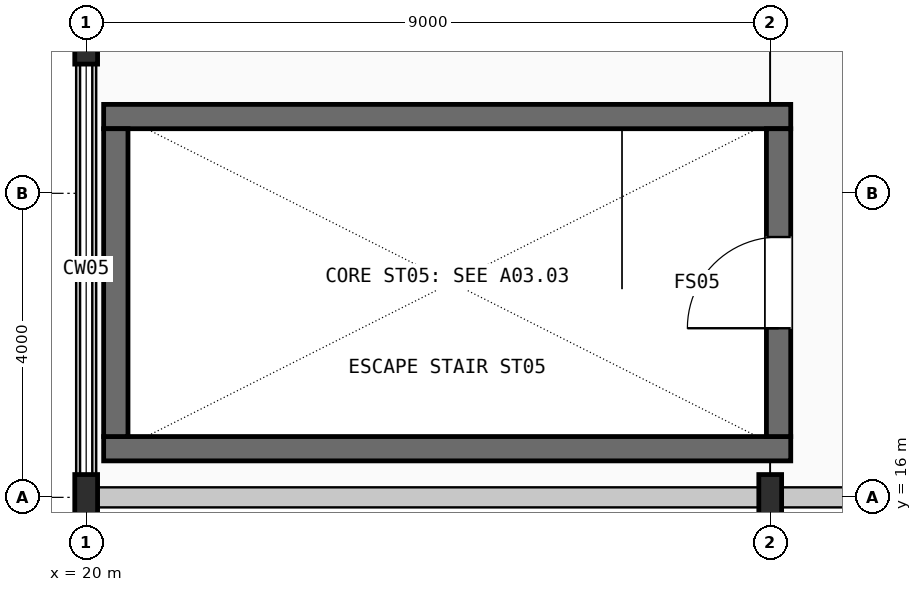
"""IFC4 building model, lengths in metres.
Left out: names, types, materials, properties, quantities, classifications, styles, units other than length and angle.
Written with IfcOpenShell. Run it as: python <this file> out.ifc"""

import sys

from ifc_helpers import new_model, si_unit, direction, frame, frame_2d, origin, origin_2d, place, context, subcontext, project, spatial, rectangle, i_section, extrude, element, fill, save


model = new_model("IFC4")
c1 = context("Model", 3, precision=1e-05, world=origin(), true_north=direction((0.0, 1.0)))
c2 = subcontext(c1, "Body", "Model", "MODEL_VIEW")
j1 = project(units=[si_unit("LENGTHUNIT", "METRE"), si_unit("PLANEANGLEUNIT", "RADIAN")], contexts=[c1])
p1 = place(None, origin())
s1 = spatial("IfcSite", under=j1, at=p1, CompositionType="ELEMENT")
p2 = place(p1, origin())
s2 = spatial("IfcBuilding", under=s1, at=p2, CompositionType="ELEMENT")
p3 = place(p2, frame((0.0, 0.0, 16.8)))
s3 = spatial("IfcBuildingStorey", under=s2, at=p3, CompositionType="ELEMENT", Elevation=16.8)
for number, where, z_axis, x_axis in (
    (1, (20.0, 16.0, 0.0), (0.0, 0.0, 1.0), (1.0, 0.0, 0.0)),
    (2, (20.0, 22.0, 0.0), (0.0, 0.0, 1.0), (1.0, 0.0, 0.0)),
    (3, (29.0, 16.0, 0.0), (0.0, 0.0, 1.0), (1.0, 0.0, 0.0)),
):
    element("IfcColumn", number, at=place(p3, frame(where, z_axis=z_axis, x_axis=x_axis)), inside=s3, PredefinedType="COLUMN", context=c2, shape_type="SweptSolid", body=[
        extrude(i_section(OverallWidth=0.3, OverallDepth=0.6, WebThickness=0.015, FlangeThickness=0.03, FilletRadius=0.027, at=origin_2d()), origin(), (0.0, 0.0, 1.0), 5.2),
    ])
for number, where, z_axis, x_axis in (
    (4, (20.23, 16.64, 0.0), (0.0, 0.0, 1.0), (1.0, 0.0, 0.0)),
    (5, (20.23, 21.01, 0.0), (0.0, 0.0, 1.0), (1.0, 0.0, 0.0)),
):
    element("IfcWall", number, at=place(p3, frame(where, z_axis=z_axis, x_axis=x_axis)), inside=s3, PredefinedType="SHEAR", context=c2, shape_type="SweptSolid", body=[
        extrude(rectangle(XDim=9.04, YDim=0.32, at=frame_2d((4.52, 0.0))), origin(), (0.0, 0.0, 1.0), 4.2),
    ])
p4 = place(p3, frame((20.39, 16.8, 0.0), z_axis=(0.0, 0.0, 1.0), x_axis=(0.0, 1.0, 0.0)))
e6 = element("IfcWall", 6, at=p4, inside=s3, PredefinedType="SHEAR", context=c2, shape_type="SweptSolid", body=[
    extrude(rectangle(XDim=4.05, YDim=0.32, at=frame_2d((2.025, 0.0))), origin(), (0.0, 0.0, 1.0), 4.2),
])
p5 = place(p3, frame((29.11, 16.8, 0.0), z_axis=(0.0, 0.0, 1.0), x_axis=(0.0, 1.0, 0.0)))
e7 = element("IfcWall", 7, at=p5, inside=s3, PredefinedType="SHEAR", context=c2, shape_type="SweptSolid", body=[
    extrude(rectangle(XDim=4.05, YDim=0.32, at=frame_2d((2.025, 0.0))), origin(), (0.0, 0.0, 1.0), 4.2),
])
p6 = place(p5, frame((1.425, 0.0, 0.0)))
e8 = element("IfcOpeningElement", 8, at=p6, cuts=e7, PredefinedType="OPENING", context=c2, shape_type="SweptSolid", body=[
    extrude(rectangle(XDim=1.2, YDim=2.2, at=frame_2d((0.6, 1.1))), frame((0.0, 0.17, 0.0), z_axis=(0.0, -1.0, 0.0), x_axis=(1.0, 0.0, 0.0)), (0.0, 0.0, 1.0), 0.34),
])
for number, where, z_axis, x_axis in (
    (9, (20.146, 16.0, 0.0), (0.0, 0.0, 1.0), (1.0, 0.0, 0.0)),
    (10, (29.146, 16.0, 0.0), (0.0, 0.0, 1.0), (1.0, 0.0, 0.0)),
):
    element("IfcWall", number, at=place(p3, frame(where, z_axis=z_axis, x_axis=x_axis)), inside=s3, PredefinedType="STANDARD", context=c2, shape_type="SweptSolid", body=[
        extrude(rectangle(XDim=8.708, YDim=0.264, at=frame_2d((4.354, 0.0))), origin(), (0.0, 0.0, 1.0), 4.4),
    ])
p7 = place(p3, frame((20.0, 16.296, 0.0), z_axis=(0.0, 0.0, 1.0), x_axis=(0.0, 1.0, 0.0)))
e11 = element("IfcWall", 11, at=p7, inside=s3, PredefinedType="STANDARD", context=c2, shape_type="SweptSolid", body=[
    extrude(rectangle(XDim=5.408, YDim=0.264, at=frame_2d((2.704, 0.0))), origin(), (0.0, 0.0, 1.0), 4.4),
])
p8 = place(p6, origin())
e12 = element("IfcDoor", 12, at=p8, inside=s3, OperationType="SINGLE_SWING_LEFT", PredefinedType="DOOR", context=c2, shape_type="SweptSolid", body=[
    extrude(rectangle(XDim=1.2, YDim=2.2, at=frame_2d((0.6, 1.1))), frame((0.0, 0.025, 0.0), z_axis=(0.0, -1.0, 0.0), x_axis=(1.0, 0.0, 0.0)), (0.0, 0.0, 1.0), 0.05),
])
fill(e8, e12)
save(model, sys.argv[1])
